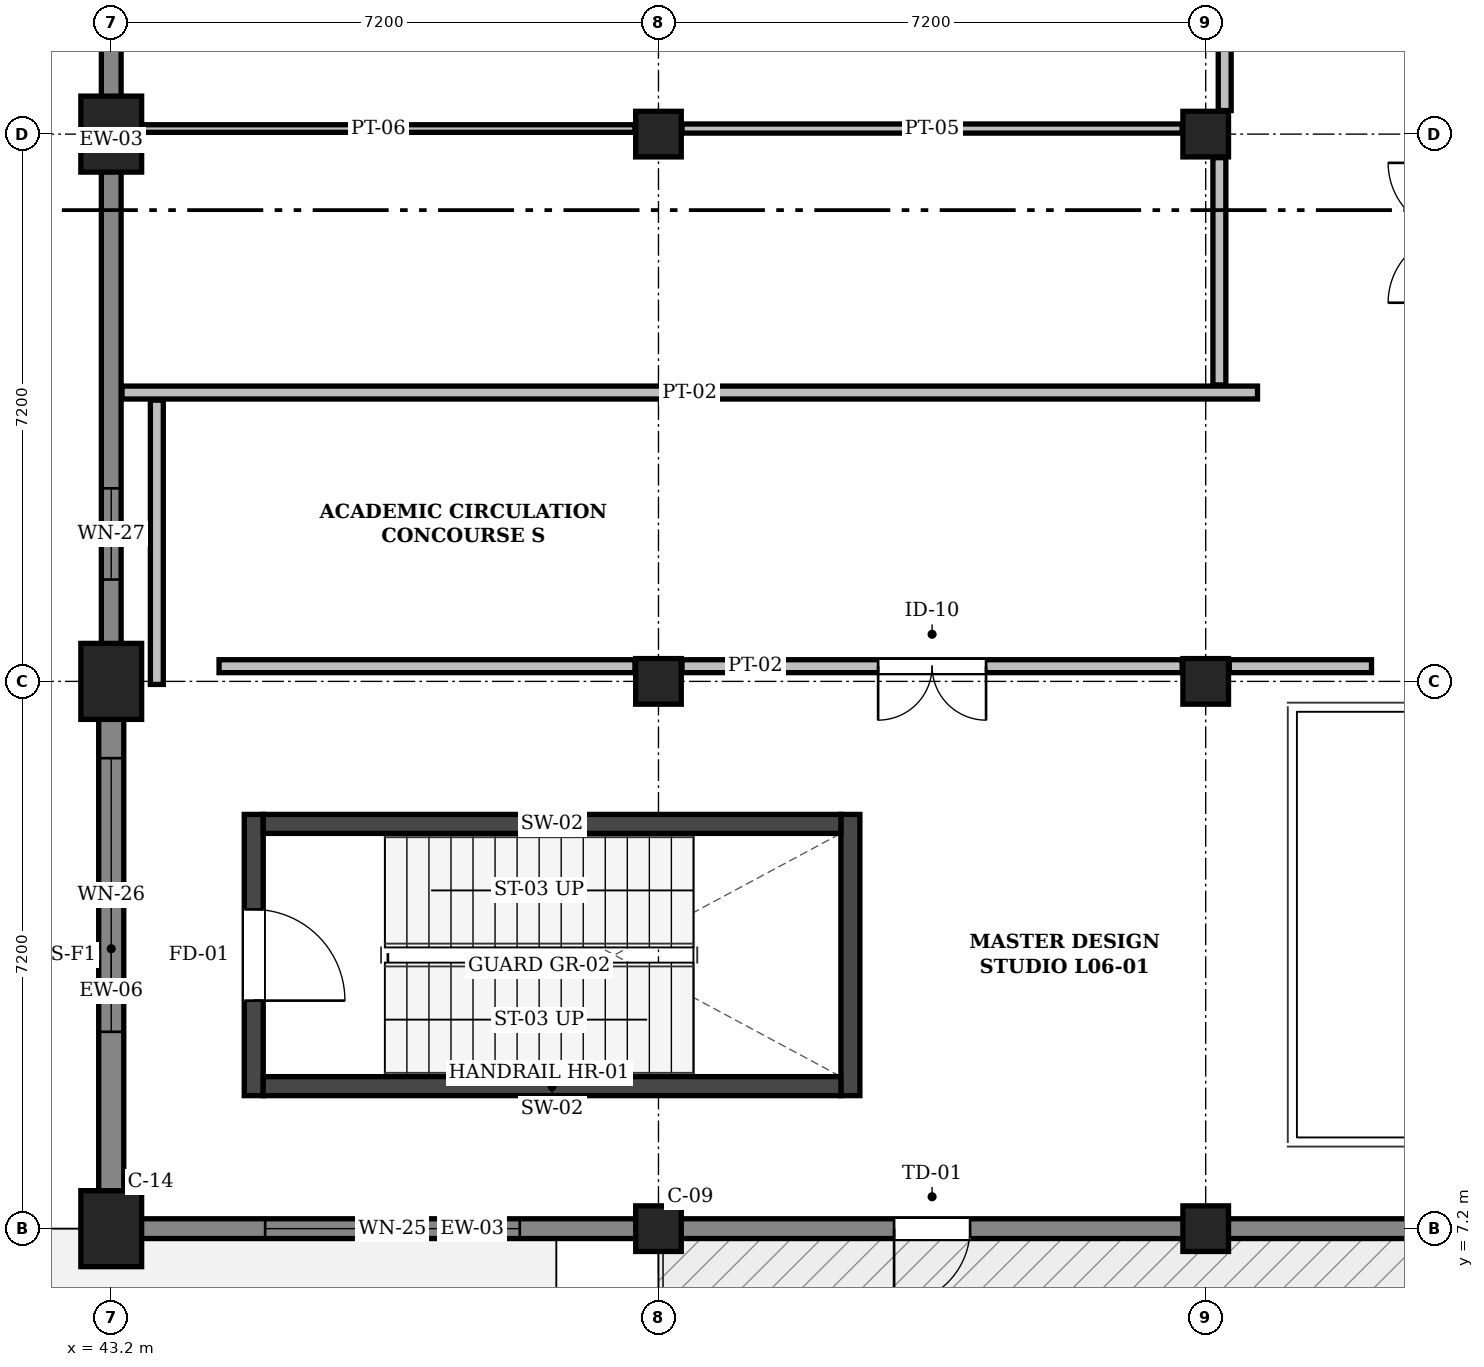
"""IFC4 building model, lengths in metres.
Left out: names, types, materials, properties, quantities, classifications, styles, units other than length and angle.
Written with IfcOpenShell. Run it as: python <this file> out.ifc"""

import sys

from ifc_helpers import new_model, si_unit, direction, frame, frame_2d, origin, origin_2d, place, context, subcontext, project, spatial, rectangle, extrude, element, fill, save


model = new_model("IFC4")
c1 = context("Model", 3, precision=1e-05, world=origin(), true_north=direction((0.0, 1.0)))
c2 = subcontext(c1, "Body", "Model", "MODEL_VIEW")
j1 = project(units=[si_unit("LENGTHUNIT", "METRE"), si_unit("PLANEANGLEUNIT", "RADIAN")], contexts=[c1])
p1 = place(None, origin())
s1 = spatial("IfcSite", under=j1, at=p1, CompositionType="ELEMENT")
p2 = place(p1, origin())
s2 = spatial("IfcBuilding", under=s1, at=p2, CompositionType="ELEMENT")
p3 = place(p2, frame((0.0, 0.0, 27.9)))
s3 = spatial("IfcBuildingStorey", under=s2, at=p3, CompositionType="ELEMENT", Elevation=27.9)
for number, where, z_axis, x_axis in (
    (1, (43.2, 7.2, 0.0), (0.0, 0.0, 1.0), (1.0, 0.0, 0.0)),
    (2, (43.2, 14.4, 0.0), (0.0, 0.0, 1.0), (1.0, 0.0, 0.0)),
    (3, (43.2, 21.6, 0.0), (0.0, 0.0, 1.0), (1.0, 0.0, 0.0)),
):
    element("IfcColumn", number, at=place(p3, frame(where, z_axis=z_axis, x_axis=x_axis)), inside=s3, PredefinedType="COLUMN", context=c2, shape_type="SweptSolid", body=[
        extrude(rectangle(XDim=0.8, YDim=1.0, at=origin_2d()), origin(), (0.0, 0.0, 1.0), 4.5),
    ])
for number, where, z_axis, x_axis in (
    (4, (50.4, 7.2, 0.0), (0.0, 0.0, 1.0), (1.0, 0.0, 0.0)),
    (5, (50.4, 14.4, 0.0), (0.0, 0.0, 1.0), (1.0, 0.0, 0.0)),
    (6, (50.4, 21.6, 0.0), (0.0, 0.0, 1.0), (1.0, 0.0, 0.0)),
    (7, (57.6, 7.2, 0.0), (0.0, 0.0, 1.0), (1.0, 0.0, 0.0)),
    (8, (57.6, 14.4, 0.0), (0.0, 0.0, 1.0), (1.0, 0.0, 0.0)),
    (9, (57.6, 21.6, 0.0), (0.0, 0.0, 1.0), (1.0, 0.0, 0.0)),
):
    element("IfcColumn", number, at=place(p3, frame(where, z_axis=z_axis, x_axis=x_axis)), inside=s3, PredefinedType="COLUMN", context=c2, shape_type="SweptSolid", body=[
        extrude(rectangle(XDim=0.6, YDim=0.6, at=origin_2d()), origin(), (0.0, 0.0, 1.0), 4.5),
    ])
p4 = place(p3, frame((64.8, 7.2, 0.0), z_axis=(0.0, 0.0, 1.0), x_axis=(-1.0, 0.0, 0.0)))
e10 = element("IfcWall", 10, at=p4, inside=s3, PredefinedType="SOLIDWALL", context=c2, shape_type="SweptSolid", body=[
    extrude(rectangle(XDim=7.2, YDim=0.26, at=frame_2d((3.6, 0.0))), origin(), (0.0, 0.0, 1.0), 4.22),
])
p5 = place(p4, frame((2.84, 0.0, 0.0)))
e11 = element("IfcOpeningElement", 11, at=p5, cuts=e10, PredefinedType="OPENING", context=c2, shape_type="SweptSolid", body=[
    extrude(rectangle(XDim=1.52, YDim=2.22, at=frame_2d((0.76, 1.11))), frame((0.0, 0.142, 0.0), z_axis=(0.0, -1.0, 0.0), x_axis=(1.0, 0.0, 0.0)), (0.0, 0.0, 1.0), 0.284),
])
p6 = place(p3, frame((57.6, 7.2, 0.0), z_axis=(0.0, 0.0, 1.0), x_axis=(-1.0, 0.0, 0.0)))
e12 = element("IfcWall", 12, at=p6, inside=s3, PredefinedType="SOLIDWALL", context=c2, shape_type="SweptSolid", body=[
    extrude(rectangle(XDim=7.2, YDim=0.26, at=frame_2d((3.6, 0.0))), origin(), (0.0, 0.0, 1.0), 4.22),
])
p7 = place(p6, frame((3.1, 0.0, 0.0)))
e13 = element("IfcOpeningElement", 13, at=p7, cuts=e12, PredefinedType="OPENING", context=c2, shape_type="SweptSolid", body=[
    extrude(rectangle(XDim=1.0, YDim=2.15, at=frame_2d((0.5, 1.075))), frame((0.0, 0.142, 0.0), z_axis=(0.0, -1.0, 0.0), x_axis=(1.0, 0.0, 0.0)), (0.0, 0.0, 1.0), 0.284),
])
p8 = place(p3, frame((50.4, 7.2, 0.0), z_axis=(0.0, 0.0, 1.0), x_axis=(-1.0, 0.0, 0.0)))
e14 = element("IfcWall", 14, at=p8, inside=s3, PredefinedType="SOLIDWALL", context=c2, shape_type="SweptSolid", body=[
    extrude(rectangle(XDim=7.35, YDim=0.26, at=frame_2d((3.675, 0.0))), origin(), (0.0, 0.0, 1.0), 4.22),
])
p9 = place(p8, frame((1.825, 0.0, 0.95)))
e15 = element("IfcOpeningElement", 15, at=p9, cuts=e14, PredefinedType="OPENING", context=c2, shape_type="SweptSolid", body=[
    extrude(rectangle(XDim=3.35, YDim=1.55, at=frame_2d((1.675, 0.775))), frame((0.0, 0.142, 0.0), z_axis=(0.0, -1.0, 0.0), x_axis=(1.0, 0.0, 0.0)), (0.0, 0.0, 1.0), 0.284),
])
p10 = place(p3, frame((43.2, 7.366, 0.0), z_axis=(0.0, 0.0, 1.0), x_axis=(0.0, 1.0, 0.0)))
e16 = element("IfcWall", 16, at=p10, inside=s3, PredefinedType="SOLIDWALL", context=c2, shape_type="SweptSolid", body=[
    extrude(rectangle(XDim=7.034, YDim=0.33, at=frame_2d((3.517, 0.0))), origin(), (0.0, 0.0, 1.0), 4.22),
])
p11 = place(p10, frame((2.424, 0.0, 0.95)))
e17 = element("IfcOpeningElement", 17, at=p11, cuts=e16, PredefinedType="OPENING", context=c2, shape_type="SweptSolid", body=[
    extrude(rectangle(XDim=3.6, YDim=1.55, at=frame_2d((1.8, 0.775))), frame((0.0, 0.177, 0.0), z_axis=(0.0, -1.0, 0.0), x_axis=(1.0, 0.0, 0.0)), (0.0, 0.0, 1.0), 0.354),
])
p12 = place(p3, frame((43.2, 14.4, 0.0), z_axis=(0.0, 0.0, 1.0), x_axis=(0.0, 1.0, 0.0)))
e18 = element("IfcWall", 18, at=p12, inside=s3, PredefinedType="SOLIDWALL", context=c2, shape_type="SweptSolid", body=[
    extrude(rectangle(XDim=7.2, YDim=0.26, at=frame_2d((3.6, 0.0))), origin(), (0.0, 0.0, 1.0), 4.22),
])
p13 = place(p12, frame((1.34, 0.0, 0.95)))
e19 = element("IfcOpeningElement", 19, at=p13, cuts=e18, PredefinedType="OPENING", context=c2, shape_type="SweptSolid", body=[
    extrude(rectangle(XDim=1.2, YDim=1.8, at=frame_2d((0.6, 0.9))), frame((0.0, 0.142, 0.0), z_axis=(0.0, -1.0, 0.0), x_axis=(1.0, 0.0, 0.0)), (0.0, 0.0, 1.0), 0.284),
])
p14 = place(p3, frame((43.2, 21.6, 0.0), z_axis=(0.0, 0.0, 1.0), x_axis=(0.0, 1.0, 0.0)))
e20 = element("IfcWall", 20, at=p14, inside=s3, PredefinedType="SOLIDWALL", context=c2, shape_type="SweptSolid", body=[
    extrude(rectangle(XDim=7.034, YDim=0.26, at=frame_2d((3.517, 0.0))), origin(), (0.0, 0.0, 1.0), 4.22),
])
p15 = place(p14, frame((2.792, 0.0, 0.95)))
e21 = element("IfcOpeningElement", 21, at=p15, cuts=e20, PredefinedType="OPENING", context=c2, shape_type="SweptSolid", body=[
    extrude(rectangle(XDim=1.45, YDim=1.8, at=frame_2d((0.725, 0.9))), frame((0.0, 0.142, 0.0), z_axis=(0.0, -1.0, 0.0), x_axis=(1.0, 0.0, 0.0)), (0.0, 0.0, 1.0), 0.284),
])
p16 = place(p3, frame((45.075, 8.95, 0.0), z_axis=(0.0, 0.0, 1.0), x_axis=(0.0, 1.0, 0.0)))
e22 = element("IfcWall", 22, at=p16, inside=s3, PredefinedType="SHEAR", context=c2, shape_type="SweptSolid", body=[
    extrude(rectangle(XDim=3.7, YDim=0.25, at=frame_2d((1.85, 0.0))), origin(), (0.0, 0.0, 1.0), 4.25),
])
p17 = place(p16, frame((1.25, 0.0, 0.0)))
e23 = element("IfcOpeningElement", 23, at=p17, cuts=e22, PredefinedType="OPENING", context=c2, shape_type="SweptSolid", body=[
    extrude(rectangle(XDim=1.2, YDim=2.15, at=frame_2d((0.6, 1.075))), frame((0.0, 0.137, 0.0), z_axis=(0.0, -1.0, 0.0), x_axis=(1.0, 0.0, 0.0)), (0.0, 0.0, 1.0), 0.274),
])
p18 = place(p3, frame((52.925, 8.95, 0.0), z_axis=(0.0, 0.0, 1.0), x_axis=(0.0, 1.0, 0.0)))
e24 = element("IfcWall", 24, at=p18, inside=s3, PredefinedType="SHEAR", context=c2, shape_type="SweptSolid", body=[
    extrude(rectangle(XDim=3.7, YDim=0.25, at=frame_2d((1.85, 0.0))), origin(), (0.0, 0.0, 1.0), 4.25),
])
for number, where, z_axis, x_axis in (
    (25, (45.2, 9.075, 0.0), (0.0, 0.0, 1.0), (1.0, 0.0, 0.0)),
    (26, (45.2, 12.525, 0.0), (0.0, 0.0, 1.0), (1.0, 0.0, 0.0)),
):
    element("IfcWall", number, at=place(p3, frame(where, z_axis=z_axis, x_axis=x_axis)), inside=s3, PredefinedType="SHEAR", context=c2, shape_type="SweptSolid", body=[
        extrude(rectangle(XDim=7.6, YDim=0.25, at=frame_2d((3.8, 0.0))), origin(), (0.0, 0.0, 1.0), 4.25),
    ])
p19 = place(p3, frame((43.342, 18.2, 0.0), z_axis=(0.0, 0.0, 1.0), x_axis=(1.0, 0.0, 0.0)))
e27 = element("IfcWall", 27, at=p19, inside=s3, PredefinedType="PARTITIONING", context=c2, shape_type="SweptSolid", body=[
    extrude(rectangle(XDim=14.939, YDim=0.17, at=frame_2d((7.47, 0.0))), origin(), (0.0, 0.0, 1.0), 4.16),
])
p20 = place(p3, frame((50.71, 14.6, 0.0), z_axis=(0.0, 0.0, 1.0), x_axis=(1.0, 0.0, 0.0)))
e28 = element("IfcWall", 28, at=p20, inside=s3, PredefinedType="PARTITIONING", context=c2, shape_type="SweptSolid", body=[
    extrude(rectangle(XDim=6.58, YDim=0.17, at=frame_2d((3.29, 0.0))), origin(), (0.0, 0.0, 1.0), 3.8),
])
p21 = place(p20, frame((2.58, 0.0, 0.0)))
e29 = element("IfcOpeningElement", 29, at=p21, cuts=e28, PredefinedType="OPENING", context=c2, shape_type="SweptSolid", body=[
    extrude(rectangle(XDim=1.42, YDim=2.24, at=frame_2d((0.71, 1.12))), frame((0.0, 0.097, 0.0), z_axis=(0.0, -1.0, 0.0), x_axis=(1.0, 0.0, 0.0)), (0.0, 0.0, 1.0), 0.194),
])
p22 = place(p3, frame((44.618, 14.6, 0.0), z_axis=(0.0, 0.0, 1.0), x_axis=(1.0, 0.0, 0.0)))
e30 = element("IfcWall", 30, at=p22, inside=s3, PredefinedType="PARTITIONING", context=c2, shape_type="SweptSolid", body=[
    extrude(rectangle(XDim=5.472, YDim=0.17, at=frame_2d((2.736, 0.0))), origin(), (0.0, 0.0, 1.0), 3.8),
])
p23 = place(p3, frame((57.91, 14.6, 0.0), z_axis=(0.0, 0.0, 1.0), x_axis=(1.0, 0.0, 0.0)))
e31 = element("IfcWall", 31, at=p23, inside=s3, PredefinedType="PARTITIONING", context=c2, shape_type="SweptSolid", body=[
    extrude(rectangle(XDim=1.872, YDim=0.17, at=frame_2d((0.936, 0.0))), origin(), (0.0, 0.0, 1.0), 3.33),
])
p24 = place(p3, frame((43.8, 14.36, 0.0), z_axis=(0.0, 0.0, 1.0), x_axis=(0.0, 1.0, 0.0)))
e32 = element("IfcWall", 32, at=p24, inside=s3, PredefinedType="PARTITIONING", context=c2, shape_type="SweptSolid", body=[
    extrude(rectangle(XDim=3.74, YDim=0.17, at=frame_2d((1.87, 0.0))), origin(), (0.0, 0.0, 1.0), 4.16),
])
p25 = place(p3, frame((57.78, 18.3, 0.0), z_axis=(0.0, 0.0, 1.0), x_axis=(0.0, 1.0, 0.0)))
e33 = element("IfcWall", 33, at=p25, inside=s3, PredefinedType="PARTITIONING", context=c2, shape_type="SweptSolid", body=[
    extrude(rectangle(XDim=2.99, YDim=0.17, at=frame_2d((1.495, 0.0))), origin(), (0.0, 0.0, 1.0), 3.78),
])
p26 = place(p3, frame((57.85, 21.91, 0.0), z_axis=(0.0, 0.0, 1.0), x_axis=(0.0, 1.0, 0.0)))
e34 = element("IfcWall", 34, at=p26, inside=s3, PredefinedType="PARTITIONING", context=c2, shape_type="SweptSolid", body=[
    extrude(rectangle(XDim=6.748, YDim=0.17, at=frame_2d((3.374, 0.0))), origin(), (0.0, 0.0, 1.0), 2.98),
])
p27 = place(p26, frame((2.62, 0.0, 0.0)))
e35 = element("IfcOpeningElement", 35, at=p27, cuts=e34, PredefinedType="OPENING", context=c2, shape_type="SweptSolid", body=[
    extrude(rectangle(XDim=1.34, YDim=2.24, at=frame_2d((0.67, 1.12))), frame((0.0, 0.097, 0.0), z_axis=(0.0, -1.0, 0.0), x_axis=(1.0, 0.0, 0.0)), (0.0, 0.0, 1.0), 0.194),
])
p28 = place(p3, frame((50.71, 21.673, 0.0), z_axis=(0.0, 0.0, 1.0), x_axis=(1.0, 0.0, 0.0)))
e36 = element("IfcWall", 36, at=p28, inside=s3, PredefinedType="PARTITIONING", context=c2, shape_type="SweptSolid", body=[
    extrude(rectangle(XDim=6.58, YDim=0.12, at=frame_2d((3.29, 0.0))), origin(), (0.0, 0.0, 1.0), 3.8),
])
p29 = place(p3, frame((43.342, 21.673, 0.0), z_axis=(0.0, 0.0, 1.0), x_axis=(1.0, 0.0, 0.0)))
e37 = element("IfcWall", 37, at=p29, inside=s3, PredefinedType="PARTITIONING", context=c2, shape_type="SweptSolid", body=[
    extrude(rectangle(XDim=6.748, YDim=0.1, at=frame_2d((3.374, 0.0))), origin(), (0.0, 0.0, 1.0), 3.8),
])
p30 = place(p7, origin())
e38 = element("IfcDoor", 38, at=p30, inside=s3, OperationType="SINGLE_SWING_RIGHT", PredefinedType="DOOR", context=c2, shape_type="SweptSolid", body=[
    extrude(rectangle(XDim=1.0, YDim=2.15, at=frame_2d((0.5, 1.075))), frame((0.0, 0.025, 0.0), z_axis=(0.0, -1.0, 0.0), x_axis=(1.0, 0.0, 0.0)), (0.0, 0.0, 1.0), 0.05),
])
fill(e13, e38)
p31 = place(p9, origin())
e39 = element("IfcWindow", 39, at=p31, inside=s3, PartitioningType="SINGLE_PANEL", PredefinedType="WINDOW", context=c2, shape_type="SweptSolid", body=[
    extrude(rectangle(XDim=3.35, YDim=1.55, at=frame_2d((1.675, 0.775))), frame((0.0, 0.03, 0.0), z_axis=(0.0, -1.0, 0.0), x_axis=(1.0, 0.0, 0.0)), (0.0, 0.0, 1.0), 0.06),
])
fill(e15, e39)
p32 = place(p11, origin())
e40 = element("IfcWindow", 40, at=p32, inside=s3, PartitioningType="SINGLE_PANEL", PredefinedType="WINDOW", context=c2, shape_type="SweptSolid", body=[
    extrude(rectangle(XDim=3.6, YDim=1.55, at=frame_2d((1.8, 0.775))), frame((0.0, 0.03, 0.0), z_axis=(0.0, -1.0, 0.0), x_axis=(1.0, 0.0, 0.0)), (0.0, 0.0, 1.0), 0.06),
])
fill(e17, e40)
p33 = place(p13, origin())
e41 = element("IfcWindow", 41, at=p33, inside=s3, PartitioningType="SINGLE_PANEL", PredefinedType="WINDOW", context=c2, shape_type="SweptSolid", body=[
    extrude(rectangle(XDim=1.2, YDim=1.8, at=frame_2d((0.6, 0.9))), frame((0.0, 0.03, 0.0), z_axis=(0.0, -1.0, 0.0), x_axis=(1.0, 0.0, 0.0)), (0.0, 0.0, 1.0), 0.06),
])
fill(e19, e41)
p34 = place(p17, frame((1.2, 0.0, 0.0), z_axis=(0.0, 0.0, 1.0), x_axis=(-1.0, 0.0, 0.0)))
e42 = element("IfcDoor", 42, at=p34, inside=s3, OperationType="SINGLE_SWING_RIGHT", PredefinedType="DOOR", context=c2, shape_type="SweptSolid", body=[
    extrude(rectangle(XDim=1.2, YDim=2.15, at=frame_2d((0.6, 1.075))), frame((0.0, 0.025, 0.0), z_axis=(0.0, -1.0, 0.0), x_axis=(1.0, 0.0, 0.0)), (0.0, 0.0, 1.0), 0.05),
])
fill(e23, e42)
p35 = place(p21, frame((1.42, 0.0, 0.0), z_axis=(0.0, 0.0, 1.0), x_axis=(-1.0, 0.0, 0.0)))
e43 = element("IfcDoor", 43, at=p35, inside=s3, OperationType="DOUBLE_DOOR_SINGLE_SWING", PredefinedType="DOOR", context=c2, shape_type="SweptSolid", body=[
    extrude(rectangle(XDim=1.42, YDim=2.24, at=frame_2d((0.71, 1.12))), frame((0.0, 0.025, 0.0), z_axis=(0.0, -1.0, 0.0), x_axis=(1.0, 0.0, 0.0)), (0.0, 0.0, 1.0), 0.05),
])
fill(e29, e43)
save(model, sys.argv[1])
